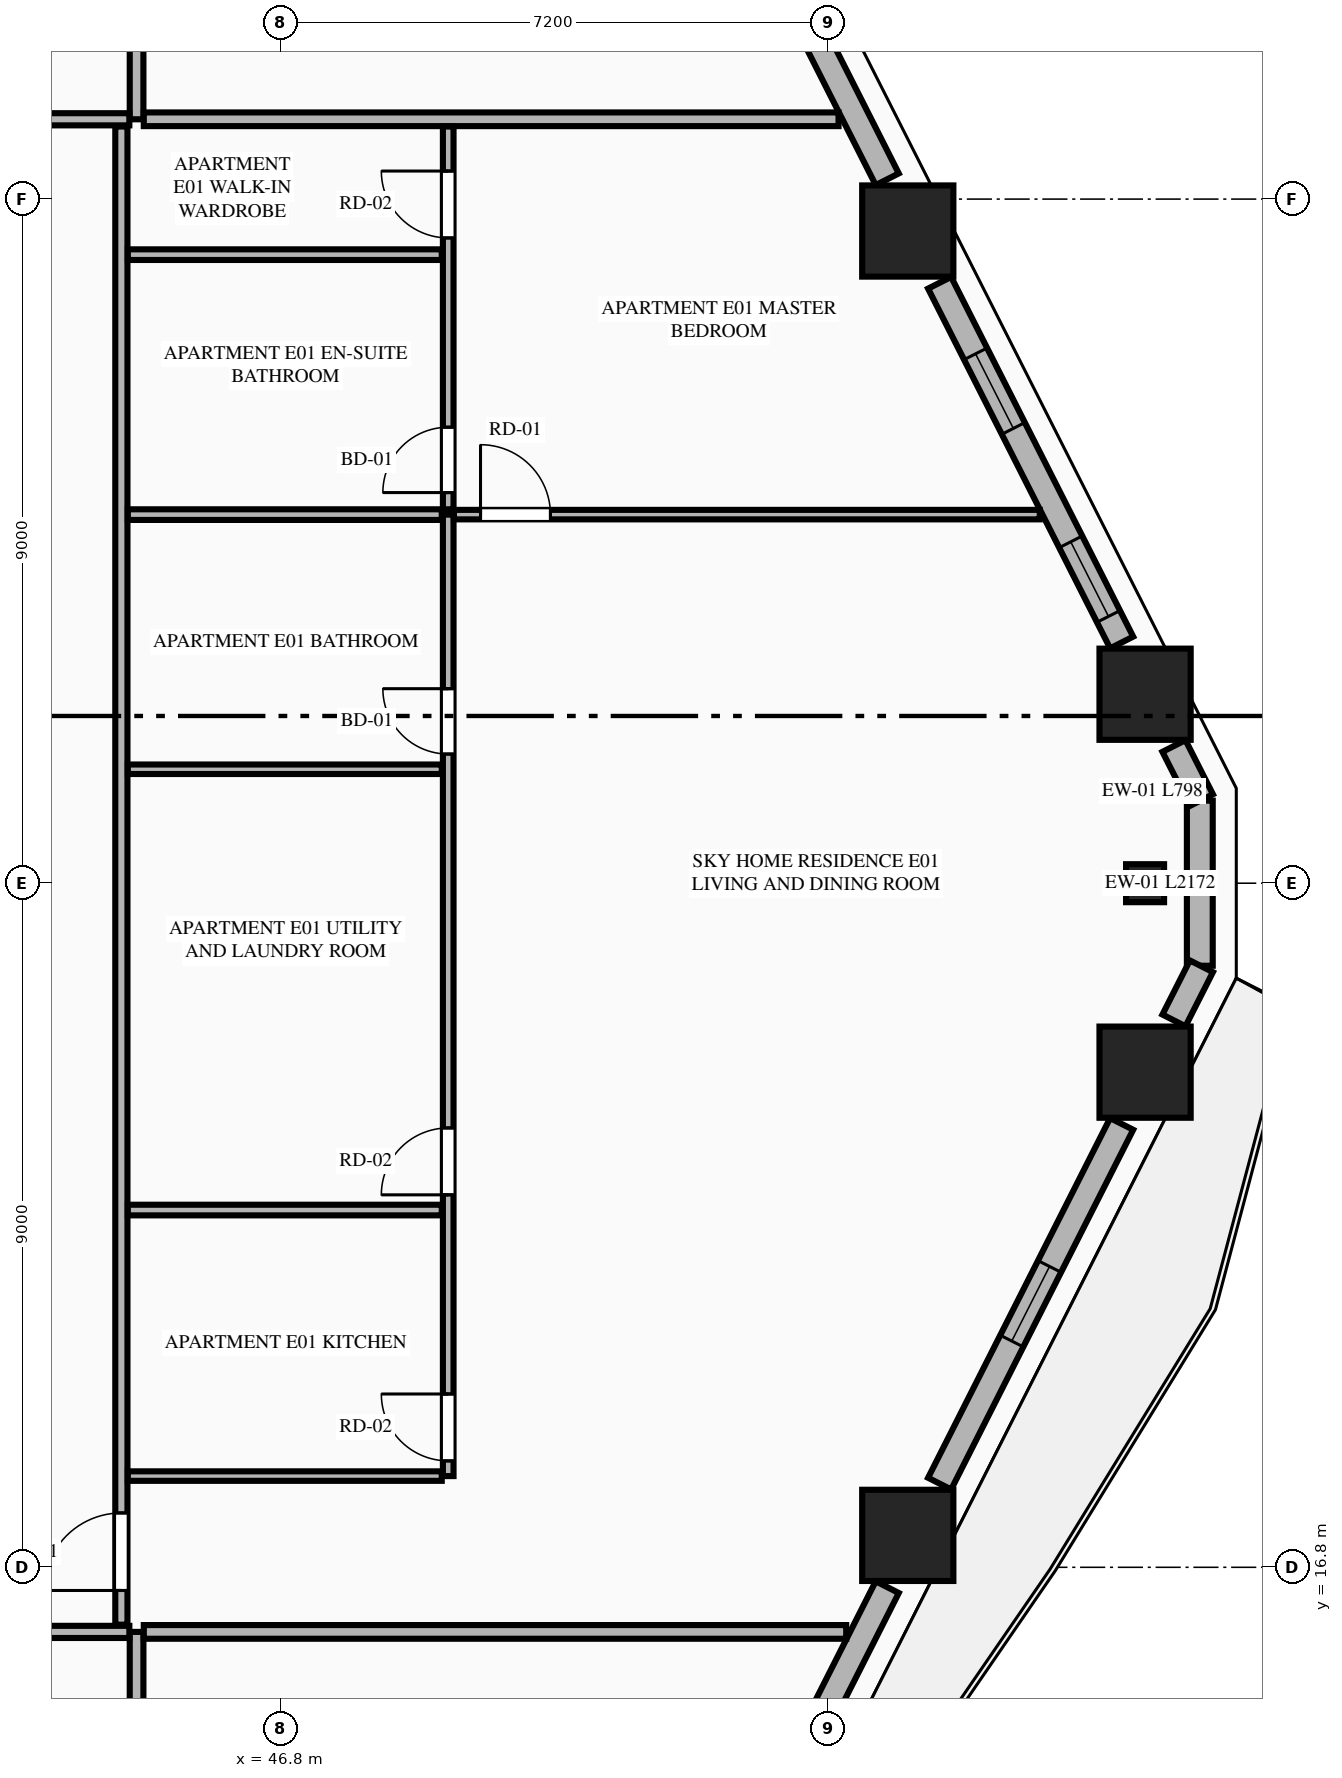
"""IFC4 building model, lengths in metres.
Left out: names, types, materials, properties, quantities, classifications, styles, units other than length and angle.
Written with IfcOpenShell. Run it as: python <this file> out.ifc"""

import sys

from ifc_helpers import new_model, si_unit, direction, frame, frame_2d, origin, origin_2d, place, context, subcontext, project, spatial, rectangle, extrude, element, fill, save


model = new_model("IFC4")
c1 = context("Model", 3, precision=1e-05, world=origin(), true_north=direction((0.0, 1.0)))
c2 = subcontext(c1, "Body", "Model", "MODEL_VIEW")
j1 = project(units=[si_unit("LENGTHUNIT", "METRE"), si_unit("PLANEANGLEUNIT", "RADIAN")], contexts=[c1])
p1 = place(None, origin())
s1 = spatial("IfcSite", under=j1, at=p1, CompositionType="ELEMENT")
p2 = place(p1, origin())
s2 = spatial("IfcBuilding", under=s1, at=p2, CompositionType="ELEMENT")
p3 = place(p2, frame((0.0, 0.0, 32.0)))
s3 = spatial("IfcBuildingStorey", under=s2, at=p3, CompositionType="ELEMENT", Elevation=32.0)
for number, where, z_axis, x_axis in (
    (1, (55.046, 17.22, 0.0), (0.0, 0.0, 1.0), (1.0, 0.0, 0.0)),
    (2, (58.168, 23.314, 0.0), (0.0, 0.0, 1.0), (1.0, 0.0, 0.0)),
    (3, (58.168, 28.286, 0.0), (0.0, 0.0, 1.0), (1.0, 0.0, 0.0)),
    (4, (55.046, 34.38, 0.0), (0.0, 0.0, 1.0), (1.0, 0.0, 0.0)),
):
    element("IfcColumn", number, at=place(p3, frame(where, z_axis=z_axis, x_axis=x_axis)), inside=s3, PredefinedType="COLUMN", context=c2, shape_type="SweptSolid", body=[
        extrude(rectangle(XDim=1.2, YDim=1.2, at=origin_2d()), origin(), (0.0, 0.0, 1.0), 3.55),
    ])
p4 = place(p3, frame((58.168, 25.8, 0.0), z_axis=(0.0, 0.0, 1.0), x_axis=(0.0, 1.0, 0.0)))
e5 = element("IfcColumn", 5, at=p4, inside=s3, PredefinedType="PILASTER", context=c2, shape_type="SweptSolid", body=[
    extrude(rectangle(XDim=0.5, YDim=0.35, at=origin_2d()), origin(), (0.0, 0.0, 1.0), 3.55),
])
p5 = place(p3, frame((58.888, 24.714, 0.0), z_axis=(0.0, 0.0, 1.0), x_axis=(0.0, 1.0, 0.0)))
e6 = element("IfcWall", 6, at=p5, inside=s3, PredefinedType="STANDARD", context=c2, shape_type="SweptSolid", body=[
    extrude(rectangle(XDim=2.172, YDim=0.34, at=frame_2d((1.086, 0.0))), origin(), (0.0, 0.0, 1.0), 3.33),
])
p6 = place(p3, frame((52.271, 11.59, 0.0), z_axis=(0.0, 0.0, 1.0), x_axis=(0.451592100298, 0.892224509273, 0.0)))
e7 = element("IfcWall", 7, at=p6, inside=s3, PredefinedType="STANDARD", context=c2, shape_type="SweptSolid", body=[
    extrude(rectangle(XDim=5.547, YDim=0.34, at=frame_2d((2.773, 0.0))), origin(), (0.0, 0.0, 1.0), 2.787),
])
p7 = place(p6, frame((1.768, 0.0, 0.0)))
e8 = element("IfcOpeningElement", 8, at=p7, cuts=e7, PredefinedType="OPENING", context=c2, shape_type="SweptSolid", body=[
    extrude(rectangle(XDim=1.1, YDim=2.25, at=frame_2d((0.55, 1.125))), frame((0.0, 0.18, 0.0), z_axis=(0.0, -1.0, 0.0), x_axis=(1.0, 0.0, 0.0)), (0.0, 0.0, 1.0), 0.36),
])
p8 = place(p3, frame((55.465, 17.901, 0.0), z_axis=(0.0, 0.0, 1.0), x_axis=(0.451572088722, 0.892234637686, 0.0)))
e9 = element("IfcWall", 9, at=p8, inside=s3, PredefinedType="STANDARD", context=c2, shape_type="SweptSolid", body=[
    extrude(rectangle(XDim=5.304, YDim=0.34, at=frame_2d((2.652, 0.0))), origin(), (0.0, 0.0, 1.0), 2.787),
])
p9 = place(p8, frame((2.102, 0.0, 0.75)))
e10 = element("IfcOpeningElement", 10, at=p9, cuts=e9, PredefinedType="OPENING", context=c2, shape_type="SweptSolid", body=[
    extrude(rectangle(XDim=1.1, YDim=1.887, at=frame_2d((0.55, 0.943))), frame((0.0, 0.18, 0.0), z_axis=(0.0, -1.0, 0.0), x_axis=(1.0, 0.0, 0.0)), (0.0, 0.0, 1.0), 0.36),
])
for number, where, z_axis, x_axis in (
    (11, (58.548, 23.995, 0.0), (0.0, 0.0, 1.0), (0.452, 0.892, 0.0)),
    (12, (58.909, 26.893, 0.0), (0.0, 0.0, 1.0), (-0.452, 0.892, 0.0)),
):
    element("IfcWall", number, at=place(p3, frame(where, z_axis=z_axis, x_axis=x_axis)), inside=s3, PredefinedType="STANDARD", context=c2, shape_type="SweptSolid", body=[
        extrude(rectangle(XDim=0.798, YDim=0.34, at=frame_2d((0.399, 0.0))), origin(), (0.0, 0.0, 1.0), 3.33),
    ])
p10 = place(p3, frame((57.86, 28.967, 0.0), z_axis=(0.0, 0.0, 1.0), x_axis=(-0.451590635984, 0.892225250422, 0.0)))
e13 = element("IfcWall", 13, at=p10, inside=s3, PredefinedType="STANDARD", context=c2, shape_type="SweptSolid", body=[
    extrude(rectangle(XDim=5.303, YDim=0.34, at=frame_2d((2.652, 0.0))), origin(), (0.0, 0.0, 1.0), 2.787),
])
p11 = place(p10, frame((0.384, 0.0, 0.75)))
e14 = element("IfcOpeningElement", 14, at=p11, cuts=e13, PredefinedType="OPENING", context=c2, shape_type="SweptSolid", body=[
    extrude(rectangle(XDim=1.1, YDim=1.887, at=frame_2d((0.55, 0.943))), frame((0.0, 0.18, 0.0), z_axis=(0.0, -1.0, 0.0), x_axis=(1.0, 0.0, 0.0)), (0.0, 0.0, 1.0), 0.36),
])
p12 = place(p10, frame((3.156, 0.0, 0.75)))
e15 = element("IfcOpeningElement", 15, at=p12, cuts=e13, PredefinedType="OPENING", context=c2, shape_type="SweptSolid", body=[
    extrude(rectangle(XDim=1.1, YDim=1.887, at=frame_2d((0.55, 0.943))), frame((0.0, 0.18, 0.0), z_axis=(0.0, -1.0, 0.0), x_axis=(1.0, 0.0, 0.0)), (0.0, 0.0, 1.0), 0.36),
])
p13 = place(p3, frame((54.776, 35.061, 0.0), z_axis=(0.0, 0.0, 1.0), x_axis=(-0.451592100298, 0.892224509273, 0.0)))
e16 = element("IfcWall", 16, at=p13, inside=s3, PredefinedType="STANDARD", context=c2, shape_type="SweptSolid", body=[
    extrude(rectangle(XDim=5.547, YDim=0.34, at=frame_2d((2.773, 0.0))), origin(), (0.0, 0.0, 1.0), 2.787),
])
p14 = place(p13, frame((2.223, 0.0, 0.75)))
e17 = element("IfcOpeningElement", 17, at=p14, cuts=e16, PredefinedType="OPENING", context=c2, shape_type="SweptSolid", body=[
    extrude(rectangle(XDim=1.1, YDim=1.887, at=frame_2d((0.55, 0.943))), frame((0.0, 0.18, 0.0), z_axis=(0.0, -1.0, 0.0), x_axis=(1.0, 0.0, 0.0)), (0.0, 0.0, 1.0), 0.36),
])
p15 = place(p3, frame((44.9, 2.455, 0.0), z_axis=(0.0, 0.0, 1.0), x_axis=(0.0, 1.0, 0.0)))
e18 = element("IfcWall", 18, at=p15, inside=s3, PredefinedType="PARTITIONING", context=c2, shape_type="SweptSolid", body=[
    extrude(rectangle(XDim=13.495, YDim=0.18, at=frame_2d((6.748, 0.0))), origin(), (0.0, 0.0, 1.0), 3.33),
])
p16 = place(p3, frame((28.373, 15.95, 0.0), z_axis=(0.0, 0.0, 1.0), x_axis=(1.0, 0.0, 0.0)))
e19 = element("IfcWall", 19, at=p16, inside=s3, PredefinedType="PARTITIONING", context=c2, shape_type="SweptSolid", body=[
    extrude(rectangle(XDim=16.432, YDim=0.16, at=frame_2d((8.216, 0.0))), origin(), (0.0, 0.0, 1.0), 3.33),
])
p17 = place(p16, frame((0.355, 0.0, 0.0)))
e20 = element("IfcOpeningElement", 20, at=p17, cuts=e19, PredefinedType="OPENING", context=c2, shape_type="SweptSolid", body=[
    extrude(rectangle(XDim=1.35, YDim=2.35, at=frame_2d((0.675, 1.175))), frame((0.0, 0.09, 0.0), z_axis=(0.0, -1.0, 0.0), x_axis=(1.0, 0.0, 0.0)), (0.0, 0.0, 1.0), 0.18),
])
p18 = place(p3, frame((44.9, 35.85, 0.0), z_axis=(0.0, 0.0, 1.0), x_axis=(0.0, 1.0, 0.0)))
e21 = element("IfcWall", 21, at=p18, inside=s3, PredefinedType="PARTITIONING", context=c2, shape_type="SweptSolid", body=[
    extrude(rectangle(XDim=13.295, YDim=0.18, at=frame_2d((6.647, 0.0))), origin(), (0.0, 0.0, 1.0), 3.33),
])
p19 = place(p3, frame((36.617, 35.85, 0.0), z_axis=(0.0, 0.0, 1.0), x_axis=(1.0, 0.0, 0.0)))
e22 = element("IfcWall", 22, at=p19, inside=s3, PredefinedType="PARTITIONING", context=c2, shape_type="SweptSolid", body=[
    extrude(rectangle(XDim=8.188, YDim=0.16, at=frame_2d((4.094, 0.0))), origin(), (0.0, 0.0, 1.0), 3.33),
])
p20 = place(p19, frame((0.355, 0.0, 0.0)))
e23 = element("IfcOpeningElement", 23, at=p20, cuts=e22, PredefinedType="OPENING", context=c2, shape_type="SweptSolid", body=[
    extrude(rectangle(XDim=1.02, YDim=2.25, at=frame_2d((0.51, 1.125))), frame((0.0, 0.09, 0.0), z_axis=(0.0, -1.0, 0.0), x_axis=(1.0, 0.0, 0.0)), (0.0, 0.0, 1.0), 0.18),
])
p21 = place(p3, frame((44.995, 15.95, 0.0), z_axis=(0.0, 0.0, 1.0), x_axis=(1.0, 0.0, 0.0)))
e24 = element("IfcWall", 24, at=p21, inside=s3, PredefinedType="PARTITIONING", context=c2, shape_type="SweptSolid", body=[
    extrude(rectangle(XDim=9.241, YDim=0.18, at=frame_2d((4.621, 0.0))), origin(), (0.0, 0.0, 1.0), 3.33),
])
p22 = place(p3, frame((44.995, 35.85, 0.0), z_axis=(0.0, 0.0, 1.0), x_axis=(1.0, 0.0, 0.0)))
e25 = element("IfcWall", 25, at=p22, inside=s3, PredefinedType="PARTITIONING", context=c2, shape_type="SweptSolid", body=[
    extrude(rectangle(XDim=9.14, YDim=0.18, at=frame_2d((4.57, 0.0))), origin(), (0.0, 0.0, 1.0), 3.33),
])
p23 = place(p3, frame((44.7, 16.045, 0.0), z_axis=(0.0, 0.0, 1.0), x_axis=(0.0, 1.0, 0.0)))
e26 = element("IfcWall", 26, at=p23, inside=s3, PredefinedType="PARTITIONING", context=c2, shape_type="SweptSolid", body=[
    extrude(rectangle(XDim=19.71, YDim=0.16, at=frame_2d((9.855, 0.0))), origin(), (0.0, 0.0, 1.0), 3.33),
])
p24 = place(p23, frame((0.45, 0.0, 0.0)))
e27 = element("IfcOpeningElement", 27, at=p24, cuts=e26, PredefinedType="OPENING", context=c2, shape_type="SweptSolid", body=[
    extrude(rectangle(XDim=1.02, YDim=2.25, at=frame_2d((0.51, 1.125))), frame((0.0, 0.09, 0.0), z_axis=(0.0, -1.0, 0.0), x_axis=(1.0, 0.0, 0.0)), (0.0, 0.0, 1.0), 0.18),
])
p25 = place(p3, frame((44.785, 18.0, 0.0), z_axis=(0.0, 0.0, 1.0), x_axis=(1.0, 0.0, 0.0)))
e28 = element("IfcWall", 28, at=p25, inside=s3, PredefinedType="PARTITIONING", context=c2, shape_type="SweptSolid", body=[
    extrude(rectangle(XDim=4.13, YDim=0.125, at=frame_2d((2.065, 0.0))), origin(), (0.0, 0.0, 1.0), 2.636),
])
p26 = place(p3, frame((49.0, 18.0, 0.0), z_axis=(0.0, 0.0, 1.0), x_axis=(0.0, 1.0, 0.0)))
e29 = element("IfcWall", 29, at=p26, inside=s3, PredefinedType="PLUMBINGWALL", context=c2, shape_type="SweptSolid", body=[
    extrude(rectangle(XDim=12.649, YDim=0.14, at=frame_2d((6.324, 0.0))), origin(), (0.0, 0.0, 1.0), 3.33),
])
p27 = place(p26, frame((0.2, 0.0, 0.0)))
e30 = element("IfcOpeningElement", 30, at=p27, cuts=e29, PredefinedType="OPENING", context=c2, shape_type="SweptSolid", body=[
    extrude(rectangle(XDim=0.88, YDim=2.15, at=frame_2d((0.44, 1.075))), frame((0.0, 0.08, 0.0), z_axis=(0.0, -1.0, 0.0), x_axis=(1.0, 0.0, 0.0)), (0.0, 0.0, 1.0), 0.16),
])
p28 = place(p26, frame((3.7, 0.0, 0.0)))
e31 = element("IfcOpeningElement", 31, at=p28, cuts=e29, PredefinedType="OPENING", context=c2, shape_type="SweptSolid", body=[
    extrude(rectangle(XDim=0.88, YDim=2.15, at=frame_2d((0.44, 1.075))), frame((0.0, 0.08, 0.0), z_axis=(0.0, -1.0, 0.0), x_axis=(1.0, 0.0, 0.0)), (0.0, 0.0, 1.0), 0.16),
])
p29 = place(p26, frame((9.499, 0.0, 0.0)))
e32 = element("IfcOpeningElement", 32, at=p29, cuts=e29, PredefinedType="OPENING", context=c2, shape_type="SweptSolid", body=[
    extrude(rectangle(XDim=0.86, YDim=2.1, at=frame_2d((0.43, 1.05))), frame((0.0, 0.08, 0.0), z_axis=(0.0, -1.0, 0.0), x_axis=(1.0, 0.0, 0.0)), (0.0, 0.0, 1.0), 0.16),
])
p30 = place(p3, frame((49.0, 30.719, 0.0), z_axis=(0.0, 0.0, 1.0), x_axis=(0.0, 1.0, 0.0)))
e33 = element("IfcWall", 33, at=p30, inside=s3, PredefinedType="PLUMBINGWALL", context=c2, shape_type="SweptSolid", body=[
    extrude(rectangle(XDim=5.036, YDim=0.14, at=frame_2d((2.518, 0.0))), origin(), (0.0, 0.0, 1.0), 3.33),
])
p31 = place(p30, frame((0.22, 0.0, 0.0)))
e34 = element("IfcOpeningElement", 34, at=p31, cuts=e33, PredefinedType="OPENING", context=c2, shape_type="SweptSolid", body=[
    extrude(rectangle(XDim=0.86, YDim=2.1, at=frame_2d((0.43, 1.05))), frame((0.0, 0.08, 0.0), z_axis=(0.0, -1.0, 0.0), x_axis=(1.0, 0.0, 0.0)), (0.0, 0.0, 1.0), 0.16),
])
p32 = place(p30, frame((3.57, 0.0, 0.0)))
e35 = element("IfcOpeningElement", 35, at=p32, cuts=e33, PredefinedType="OPENING", context=c2, shape_type="SweptSolid", body=[
    extrude(rectangle(XDim=0.88, YDim=2.15, at=frame_2d((0.44, 1.075))), frame((0.0, 0.08, 0.0), z_axis=(0.0, -1.0, 0.0), x_axis=(1.0, 0.0, 0.0)), (0.0, 0.0, 1.0), 0.16),
])
p33 = place(p3, frame((44.785, 30.649, 0.0), z_axis=(0.0, 0.0, 1.0), x_axis=(1.0, 0.0, 0.0)))
e36 = element("IfcWall", 36, at=p33, inside=s3, PredefinedType="PLUMBINGWALL", context=c2, shape_type="SweptSolid", body=[
    extrude(rectangle(XDim=4.13, YDim=0.14, at=frame_2d((2.065, 0.0))), origin(), (0.0, 0.0, 1.0), 3.33),
])
p34 = place(p3, frame((49.075, 30.649, 0.0), z_axis=(0.0, 0.0, 1.0), x_axis=(1.0, 0.0, 0.0)))
e37 = element("IfcWall", 37, at=p34, inside=s3, PredefinedType="PARTITIONING", context=c2, shape_type="SweptSolid", body=[
    extrude(rectangle(XDim=7.707, YDim=0.125, at=frame_2d((3.854, 0.0))), origin(), (0.0, 0.0, 1.0), 3.33),
])
p35 = place(p34, frame((0.35, 0.0, 0.0)))
e38 = element("IfcOpeningElement", 38, at=p35, cuts=e37, PredefinedType="OPENING", context=c2, shape_type="SweptSolid", body=[
    extrude(rectangle(XDim=0.92, YDim=2.15, at=frame_2d((0.46, 1.075))), frame((0.0, 0.073, 0.0), z_axis=(0.0, -1.0, 0.0), x_axis=(1.0, 0.0, 0.0)), (0.0, 0.0, 1.0), 0.145),
])
p36 = place(p3, frame((44.785, 21.5, 0.0), z_axis=(0.0, 0.0, 1.0), x_axis=(1.0, 0.0, 0.0)))
e39 = element("IfcWall", 39, at=p36, inside=s3, PredefinedType="PLUMBINGWALL", context=c2, shape_type="SweptSolid", body=[
    extrude(rectangle(XDim=4.13, YDim=0.14, at=frame_2d((2.065, 0.0))), origin(), (0.0, 0.0, 1.0), 3.33),
])
p37 = place(p3, frame((44.785, 27.299, 0.0), z_axis=(0.0, 0.0, 1.0), x_axis=(1.0, 0.0, 0.0)))
e40 = element("IfcWall", 40, at=p37, inside=s3, PredefinedType="PARTITIONING", context=c2, shape_type="SweptSolid", body=[
    extrude(rectangle(XDim=4.13, YDim=0.125, at=frame_2d((2.065, 0.0))), origin(), (0.0, 0.0, 1.0), 3.33),
])
p38 = place(p3, frame((44.785, 34.069, 0.0), z_axis=(0.0, 0.0, 1.0), x_axis=(1.0, 0.0, 0.0)))
e41 = element("IfcWall", 41, at=p38, inside=s3, PredefinedType="PLUMBINGWALL", context=c2, shape_type="SweptSolid", body=[
    extrude(rectangle(XDim=4.13, YDim=0.14, at=frame_2d((2.065, 0.0))), origin(), (0.0, 0.0, 1.0), 2.636),
])
p39 = place(p9, origin())
e42 = element("IfcWindow", 42, at=p39, inside=s3, PartitioningType="SINGLE_PANEL", PredefinedType="WINDOW", context=c2, shape_type="SweptSolid", body=[
    extrude(rectangle(XDim=1.1, YDim=1.887, at=frame_2d((0.55, 0.943))), frame((0.0, 0.03, 0.0), z_axis=(0.0, -1.0, 0.0), x_axis=(1.0, 0.0, 0.0)), (0.0, 0.0, 1.0), 0.06),
])
fill(e10, e42)
p40 = place(p11, origin())
e43 = element("IfcWindow", 43, at=p40, inside=s3, PartitioningType="SINGLE_PANEL", PredefinedType="WINDOW", context=c2, shape_type="SweptSolid", body=[
    extrude(rectangle(XDim=1.1, YDim=1.887, at=frame_2d((0.55, 0.943))), frame((0.0, 0.03, 0.0), z_axis=(0.0, -1.0, 0.0), x_axis=(1.0, 0.0, 0.0)), (0.0, 0.0, 1.0), 0.06),
])
fill(e14, e43)
p41 = place(p27, origin())
e44 = element("IfcDoor", 44, at=p41, inside=s3, OperationType="SINGLE_SWING_RIGHT", PredefinedType="DOOR", context=c2, shape_type="SweptSolid", body=[
    extrude(rectangle(XDim=0.88, YDim=2.15, at=frame_2d((0.44, 1.075))), frame((0.0, 0.025, 0.0), z_axis=(0.0, -1.0, 0.0), x_axis=(1.0, 0.0, 0.0)), (0.0, 0.0, 1.0), 0.05),
])
fill(e30, e44)
p42 = place(p28, origin())
e45 = element("IfcDoor", 45, at=p42, inside=s3, OperationType="SINGLE_SWING_LEFT", PredefinedType="DOOR", context=c2, shape_type="SweptSolid", body=[
    extrude(rectangle(XDim=0.88, YDim=2.15, at=frame_2d((0.44, 1.075))), frame((0.0, 0.025, 0.0), z_axis=(0.0, -1.0, 0.0), x_axis=(1.0, 0.0, 0.0)), (0.0, 0.0, 1.0), 0.05),
])
fill(e31, e45)
p43 = place(p29, origin())
e46 = element("IfcDoor", 46, at=p43, inside=s3, OperationType="SINGLE_SWING_RIGHT", PredefinedType="DOOR", context=c2, shape_type="SweptSolid", body=[
    extrude(rectangle(XDim=0.86, YDim=2.1, at=frame_2d((0.43, 1.05))), frame((0.0, 0.025, 0.0), z_axis=(0.0, -1.0, 0.0), x_axis=(1.0, 0.0, 0.0)), (0.0, 0.0, 1.0), 0.05),
])
fill(e32, e46)
p44 = place(p31, origin())
e47 = element("IfcDoor", 47, at=p44, inside=s3, OperationType="SINGLE_SWING_LEFT", PredefinedType="DOOR", context=c2, shape_type="SweptSolid", body=[
    extrude(rectangle(XDim=0.86, YDim=2.1, at=frame_2d((0.43, 1.05))), frame((0.0, 0.025, 0.0), z_axis=(0.0, -1.0, 0.0), x_axis=(1.0, 0.0, 0.0)), (0.0, 0.0, 1.0), 0.05),
])
fill(e34, e47)
p45 = place(p32, origin())
e48 = element("IfcDoor", 48, at=p45, inside=s3, OperationType="SINGLE_SWING_RIGHT", PredefinedType="DOOR", context=c2, shape_type="SweptSolid", body=[
    extrude(rectangle(XDim=0.88, YDim=2.15, at=frame_2d((0.44, 1.075))), frame((0.0, 0.025, 0.0), z_axis=(0.0, -1.0, 0.0), x_axis=(1.0, 0.0, 0.0)), (0.0, 0.0, 1.0), 0.05),
])
fill(e35, e48)
p46 = place(p24, origin())
e49 = element("IfcDoor", 49, at=p46, inside=s3, OperationType="SINGLE_SWING_LEFT", PredefinedType="DOOR", context=c2, shape_type="SweptSolid", body=[
    extrude(rectangle(XDim=1.02, YDim=2.25, at=frame_2d((0.51, 1.125))), frame((0.0, 0.025, 0.0), z_axis=(0.0, -1.0, 0.0), x_axis=(1.0, 0.0, 0.0)), (0.0, 0.0, 1.0), 0.05),
])
fill(e27, e49)
p47 = place(p35, origin())
e50 = element("IfcDoor", 50, at=p47, inside=s3, OperationType="SINGLE_SWING_LEFT", PredefinedType="DOOR", context=c2, shape_type="SweptSolid", body=[
    extrude(rectangle(XDim=0.92, YDim=2.15, at=frame_2d((0.46, 1.075))), frame((0.0, 0.025, 0.0), z_axis=(0.0, -1.0, 0.0), x_axis=(1.0, 0.0, 0.0)), (0.0, 0.0, 1.0), 0.05),
])
fill(e38, e50)
p48 = place(p12, origin())
e51 = element("IfcWindow", 51, at=p48, inside=s3, PartitioningType="SINGLE_PANEL", PredefinedType="WINDOW", context=c2, shape_type="SweptSolid", body=[
    extrude(rectangle(XDim=1.1, YDim=1.887, at=frame_2d((0.55, 0.943))), frame((0.0, 0.03, 0.0), z_axis=(0.0, -1.0, 0.0), x_axis=(1.0, 0.0, 0.0)), (0.0, 0.0, 1.0), 0.06),
])
fill(e15, e51)
save(model, sys.argv[1])
